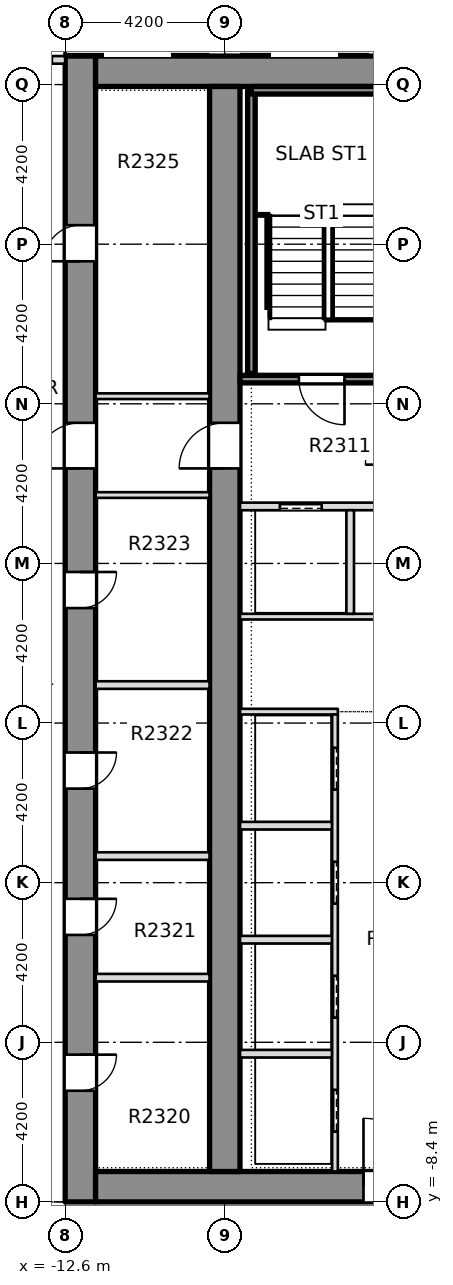
"""IFC4 building model, lengths in metres.
Left out: names, types, materials, properties, quantities, classifications, styles, units other than length and angle.
Written with IfcOpenShell. Run it as: python <this file> out.ifc"""

import sys

from ifc_helpers import new_model, si_unit, direction, frame, frame_2d, origin, place, context, subcontext, project, spatial, rectangle, extrude, element, fill, save


model = new_model("IFC4")
c1 = context("Model", 3, precision=1e-05, world=origin(), true_north=direction((0.0, 1.0)))
c2 = subcontext(c1, "Body", "Model", "MODEL_VIEW")
j1 = project(units=[si_unit("LENGTHUNIT", "METRE"), si_unit("PLANEANGLEUNIT", "RADIAN")], contexts=[c1])
p1 = place(None, origin())
s1 = spatial("IfcSite", under=j1, at=p1, CompositionType="ELEMENT")
p2 = place(p1, origin())
s2 = spatial("IfcBuilding", under=s1, at=p2, CompositionType="ELEMENT")
p3 = place(p2, frame((0.0, 0.0, 94.2)))
s3 = spatial("IfcBuildingStorey", under=s2, at=p3, CompositionType="ELEMENT", Elevation=94.2)
p4 = place(p3, frame((-12.2, -8.4, -0.32), z_axis=(0.0, 0.0, 1.0), x_axis=(0.0, 1.0, 0.0)))
e1 = element("IfcWall", 1, at=p4, inside=s3, PredefinedType="SHEAR", context=c2, shape_type="SweptSolid", body=[
    extrude(rectangle(XDim=30.15, YDim=0.8, at=frame_2d((15.075, 0.0))), origin(), (0.0, 0.0, 1.0), 3.45),
])
p5 = place(p4, frame((2.925, 0.0, 0.32)))
e2 = element("IfcOpeningElement", 2, at=p5, cuts=e1, PredefinedType="OPENING", context=c2, shape_type="SweptSolid", body=[
    extrude(rectangle(XDim=0.95, YDim=2.1, at=frame_2d((0.475, 1.05))), frame((0.0, 0.41, 0.0), z_axis=(0.0, -1.0, 0.0), x_axis=(1.0, 0.0, 0.0)), (0.0, 0.0, 1.0), 0.82),
])
p6 = place(p4, frame((7.025, 0.0, 0.32)))
e3 = element("IfcOpeningElement", 3, at=p6, cuts=e1, PredefinedType="OPENING", context=c2, shape_type="SweptSolid", body=[
    extrude(rectangle(XDim=0.95, YDim=2.1, at=frame_2d((0.475, 1.05))), frame((0.0, 0.41, 0.0), z_axis=(0.0, -1.0, 0.0), x_axis=(1.0, 0.0, 0.0)), (0.0, 0.0, 1.0), 0.82),
])
p7 = place(p4, frame((10.875, 0.0, 0.32)))
e4 = element("IfcOpeningElement", 4, at=p7, cuts=e1, PredefinedType="OPENING", context=c2, shape_type="SweptSolid", body=[
    extrude(rectangle(XDim=0.95, YDim=2.1, at=frame_2d((0.475, 1.05))), frame((0.0, 0.41, 0.0), z_axis=(0.0, -1.0, 0.0), x_axis=(1.0, 0.0, 0.0)), (0.0, 0.0, 1.0), 0.82),
])
p8 = place(p4, frame((15.625, 0.0, 0.32)))
e5 = element("IfcOpeningElement", 5, at=p8, cuts=e1, PredefinedType="OPENING", context=c2, shape_type="SweptSolid", body=[
    extrude(rectangle(XDim=0.95, YDim=2.1, at=frame_2d((0.475, 1.05))), frame((0.0, 0.41, 0.0), z_axis=(0.0, -1.0, 0.0), x_axis=(1.0, 0.0, 0.0)), (0.0, 0.0, 1.0), 0.82),
])
p9 = place(p4, frame((24.75, 0.0, 0.32)))
e6 = element("IfcOpeningElement", 6, at=p9, cuts=e1, PredefinedType="OPENING", context=c2, shape_type="SweptSolid", body=[
    extrude(rectangle(XDim=0.95, YDim=2.1, at=frame_2d((0.475, 1.05))), frame((0.0, 0.41, 0.0), z_axis=(0.0, -1.0, 0.0), x_axis=(1.0, 0.0, 0.0)), (0.0, 0.0, 1.0), 0.82),
])
p10 = place(p4, frame((19.3, 0.0, 0.32)))
e7 = element("IfcOpeningElement", 7, at=p10, cuts=e1, PredefinedType="OPENING", context=c2, shape_type="SweptSolid", body=[
    extrude(rectangle(XDim=1.2, YDim=2.1, at=frame_2d((0.6, 1.05))), frame((0.0, 0.41, 0.0), z_axis=(0.0, -1.0, 0.0), x_axis=(1.0, 0.0, 0.0)), (0.0, 0.0, 1.0), 0.82),
])
p11 = place(p3, frame((-11.8, -8.0, -0.32), z_axis=(0.0, 0.0, 1.0), x_axis=(1.0, 0.0, 0.0)))
e8 = element("IfcWall", 8, at=p11, inside=s3, PredefinedType="SHEAR", context=c2, shape_type="SweptSolid", body=[
    extrude(rectangle(XDim=23.6, YDim=0.8, at=frame_2d((11.8, 0.0))), origin(), (0.0, 0.0, 1.0), 3.45),
])
p12 = place(p11, frame((7.05, 0.0, 0.32)))
e9 = element("IfcOpeningElement", 9, at=p12, cuts=e8, PredefinedType="OPENING", context=c2, shape_type="SweptSolid", body=[
    extrude(rectangle(XDim=1.8, YDim=2.1, at=frame_2d((0.9, 1.05))), frame((0.0, 0.41, 0.0), z_axis=(0.0, -1.0, 0.0), x_axis=(1.0, 0.0, 0.0)), (0.0, 0.0, 1.0), 0.82),
])
p13 = place(p11, frame((14.75, 0.0, 0.32)))
e10 = element("IfcOpeningElement", 10, at=p13, cuts=e8, PredefinedType="OPENING", context=c2, shape_type="SweptSolid", body=[
    extrude(rectangle(XDim=1.8, YDim=2.1, at=frame_2d((0.9, 1.05))), frame((0.0, 0.41, 0.0), z_axis=(0.0, -1.0, 0.0), x_axis=(1.0, 0.0, 0.0)), (0.0, 0.0, 1.0), 0.82),
])
p14 = place(p3, frame((-11.8, 21.35, -0.32), z_axis=(0.0, 0.0, 1.0), x_axis=(1.0, 0.0, 0.0)))
e11 = element("IfcWall", 11, at=p14, inside=s3, PredefinedType="SHEAR", context=c2, shape_type="SweptSolid", body=[
    extrude(rectangle(XDim=23.6, YDim=0.8, at=frame_2d((11.8, 0.0))), origin(), (0.0, 0.0, 1.0), 3.45),
])
p15 = place(p3, frame((-8.4, -7.6, -0.32), z_axis=(0.0, 0.0, 1.0), x_axis=(0.0, 1.0, 0.0)))
e12 = element("IfcWall", 12, at=p15, inside=s3, PredefinedType="SHEAR", context=c2, shape_type="SweptSolid", body=[
    extrude(rectangle(XDim=28.55, YDim=0.8, at=frame_2d((14.275, 0.0))), origin(), (0.0, 0.0, 1.0), 3.45),
])
p16 = place(p15, frame((18.5, 0.0, 0.32)))
e13 = element("IfcOpeningElement", 13, at=p16, cuts=e12, PredefinedType="OPENING", context=c2, shape_type="SweptSolid", body=[
    extrude(rectangle(XDim=1.2, YDim=2.1, at=frame_2d((0.6, 1.05))), frame((0.0, 0.41, 0.0), z_axis=(0.0, -1.0, 0.0), x_axis=(1.0, 0.0, 0.0)), (0.0, 0.0, 1.0), 0.82),
])
p17 = place(p3, frame((-12.6, 21.65, 0.0), z_axis=(0.0, 0.0, 1.0), x_axis=(-1.0, 0.0, 0.0)))
e14 = element("IfcWall", 14, at=p17, inside=s3, PredefinedType="STANDARD", context=c2, shape_type="SweptSolid", body=[
    extrude(rectangle(XDim=3.6, YDim=0.2, at=frame_2d((1.8, 0.0))), origin(), (0.0, 0.0, 1.0), 3.13),
])
p18 = place(p17, frame((0.35, 0.0, 0.2)))
e15 = element("IfcOpeningElement", 15, at=p18, cuts=e14, PredefinedType="OPENING", context=c2, shape_type="SweptSolid", body=[
    extrude(rectangle(XDim=1.8, YDim=2.65, at=frame_2d((0.9, 1.325))), frame((0.0, 0.11, 0.0), z_axis=(0.0, -1.0, 0.0), x_axis=(1.0, 0.0, 0.0)), (0.0, 0.0, 1.0), 0.22),
])
p19 = place(p17, frame((2.3, 0.0, 0.0)))
e16 = element("IfcOpeningElement", 16, at=p19, cuts=e14, PredefinedType="OPENING", context=c2, shape_type="SweptSolid", body=[
    extrude(rectangle(XDim=1.0, YDim=2.4, at=frame_2d((0.5, 1.2))), frame((0.0, 0.11, 0.0), z_axis=(0.0, -1.0, 0.0), x_axis=(1.0, 0.0, 0.0)), (0.0, 0.0, 1.0), 0.22),
])
for number, where, z_axis, x_axis in (
    (17, (-7.999, -4.5, 0.0), (0.0, 0.0, 1.0), (1.0, 0.0, 0.0)),
    (18, (-7.999, -1.5, 0.0), (0.0, 0.0, 1.0), (1.0, 0.0, 0.0)),
    (19, (-7.999, 1.5, 0.0), (0.0, 0.0, 1.0), (1.0, 0.0, 0.0)),
):
    element("IfcWall", number, at=place(p3, frame(where, z_axis=z_axis, x_axis=x_axis)), inside=s3, PredefinedType="PARTITIONING", context=c2, shape_type="SweptSolid", body=[
        extrude(rectangle(XDim=2.424, YDim=0.2, at=frame_2d((1.212, 0.0))), origin(), (0.0, 0.0, 1.0), 3.13),
    ])
p20 = place(p3, frame((-7.999, 4.5, 0.0), z_axis=(0.0, 0.0, 1.0), x_axis=(1.0, 0.0, 0.0)))
e20 = element("IfcWall", 20, at=p20, inside=s3, PredefinedType="PARTITIONING", context=c2, shape_type="SweptSolid", body=[
    extrude(rectangle(XDim=2.574, YDim=0.15, at=frame_2d((1.287, 0.0))), origin(), (0.0, 0.0, 1.0), 3.13),
])
p21 = place(p3, frame((-7.999, 7.0, 0.0), z_axis=(0.0, 0.0, 1.0), x_axis=(1.0, 0.0, 0.0)))
e21 = element("IfcWall", 21, at=p21, inside=s3, PredefinedType="PARTITIONING", context=c2, shape_type="SweptSolid", body=[
    extrude(rectangle(XDim=15.998, YDim=0.15, at=frame_2d((7.999, 0.0))), origin(), (0.0, 0.0, 1.0), 3.13),
])
p22 = place(p21, frame((7.299, 0.0, 0.0)))
e22 = element("IfcOpeningElement", 22, at=p22, cuts=e21, PredefinedType="OPENING", context=c2, shape_type="SweptSolid", body=[
    extrude(rectangle(XDim=1.4, YDim=2.1, at=frame_2d((0.7, 1.05))), frame((0.0, 0.085, 0.0), z_axis=(0.0, -1.0, 0.0), x_axis=(1.0, 0.0, 0.0)), (0.0, 0.0, 1.0), 0.17),
])
p23 = place(p3, frame((-7.999, 9.9, 0.0), z_axis=(0.0, 0.0, 1.0), x_axis=(1.0, 0.0, 0.0)))
e23 = element("IfcWall", 23, at=p23, inside=s3, PredefinedType="PARTITIONING", context=c2, shape_type="SweptSolid", body=[
    extrude(rectangle(XDim=4.399, YDim=0.2, at=frame_2d((2.199, 0.0))), origin(), (0.0, 0.0, 1.0), 3.13),
])
p24 = place(p23, frame((1.049, 0.0, 0.0)))
e24 = element("IfcOpeningElement", 24, at=p24, cuts=e23, PredefinedType="OPENING", context=c2, shape_type="SweptSolid", body=[
    extrude(rectangle(XDim=1.1, YDim=2.1, at=frame_2d((0.55, 1.05))), frame((0.0, 0.11, 0.0), z_axis=(0.0, -1.0, 0.0), x_axis=(1.0, 0.0, 0.0)), (0.0, 0.0, 1.0), 0.22),
])
p25 = place(p3, frame((-7.999, 13.25, 0.0), z_axis=(0.0, 0.0, 1.0), x_axis=(1.0, 0.0, 0.0)))
e25 = element("IfcWall", 25, at=p25, inside=s3, PredefinedType="SOLIDWALL", context=c2, shape_type="SweptSolid", body=[
    extrude(rectangle(XDim=4.574, YDim=0.2, at=frame_2d((2.287, 0.0))), origin(), (0.0, 0.0, 1.0), 3.13),
])
p26 = place(p25, frame((1.549, 0.0, 0.0)))
e26 = element("IfcOpeningElement", 26, at=p26, cuts=e25, PredefinedType="OPENING", context=c2, shape_type="SweptSolid", body=[
    extrude(rectangle(XDim=1.2, YDim=2.1, at=frame_2d((0.6, 1.05))), frame((0.0, 0.11, 0.0), z_axis=(0.0, -1.0, 0.0), x_axis=(1.0, 0.0, 0.0)), (0.0, 0.0, 1.0), 0.22),
])
p27 = place(p3, frame((-5.5, -7.599, 0.0), z_axis=(0.0, 0.0, 1.0), x_axis=(0.0, 1.0, 0.0)))
e27 = element("IfcWall", 27, at=p27, inside=s3, PredefinedType="PARTITIONING", context=c2, shape_type="SweptSolid", body=[
    extrude(rectangle(XDim=12.024, YDim=0.15, at=frame_2d((6.012, 0.0))), origin(), (0.0, 0.0, 1.0), 3.13),
])
p28 = place(p27, frame((1.049, 0.0, 0.0)))
e28 = element("IfcOpeningElement", 28, at=p28, cuts=e27, PredefinedType="OPENING", context=c2, shape_type="SweptSolid", body=[
    extrude(rectangle(XDim=1.1, YDim=2.1, at=frame_2d((0.55, 1.05))), frame((0.0, 0.085, 0.0), z_axis=(0.0, -1.0, 0.0), x_axis=(1.0, 0.0, 0.0)), (0.0, 0.0, 1.0), 0.17),
])
p29 = place(p27, frame((4.049, 0.0, 0.0)))
e29 = element("IfcOpeningElement", 29, at=p29, cuts=e27, PredefinedType="OPENING", context=c2, shape_type="SweptSolid", body=[
    extrude(rectangle(XDim=1.1, YDim=2.1, at=frame_2d((0.55, 1.05))), frame((0.0, 0.085, 0.0), z_axis=(0.0, -1.0, 0.0), x_axis=(1.0, 0.0, 0.0)), (0.0, 0.0, 1.0), 0.17),
])
p30 = place(p27, frame((7.049, 0.0, 0.0)))
e30 = element("IfcOpeningElement", 30, at=p30, cuts=e27, PredefinedType="OPENING", context=c2, shape_type="SweptSolid", body=[
    extrude(rectangle(XDim=1.1, YDim=2.1, at=frame_2d((0.55, 1.05))), frame((0.0, 0.085, 0.0), z_axis=(0.0, -1.0, 0.0), x_axis=(1.0, 0.0, 0.0)), (0.0, 0.0, 1.0), 0.17),
])
p31 = place(p27, frame((10.049, 0.0, 0.0)))
e31 = element("IfcOpeningElement", 31, at=p31, cuts=e27, PredefinedType="OPENING", context=c2, shape_type="SweptSolid", body=[
    extrude(rectangle(XDim=1.1, YDim=2.1, at=frame_2d((0.55, 1.05))), frame((0.0, 0.085, 0.0), z_axis=(0.0, -1.0, 0.0), x_axis=(1.0, 0.0, 0.0)), (0.0, 0.0, 1.0), 0.17),
])
p32 = place(p3, frame((-5.1, 7.075, 0.0), z_axis=(0.0, 0.0, 1.0), x_axis=(0.0, 1.0, 0.0)))
e32 = element("IfcWall", 32, at=p32, inside=s3, PredefinedType="PARTITIONING", context=c2, shape_type="SweptSolid", body=[
    extrude(rectangle(XDim=2.725, YDim=0.2, at=frame_2d((1.363, 0.0))), origin(), (0.0, 0.0, 1.0), 3.13),
])
for number, where, z_axis, x_axis in (
    (33, (-11.799, -2.5, 0.0), (0.0, 0.0, 1.0), (1.0, 0.0, 0.0)),
    (34, (-11.799, 0.7, 0.0), (0.0, 0.0, 1.0), (1.0, 0.0, 0.0)),
    (35, (-11.799, 5.2, 0.0), (0.0, 0.0, 1.0), (1.0, 0.0, 0.0)),
):
    element("IfcWall", number, at=place(p3, frame(where, z_axis=z_axis, x_axis=x_axis)), inside=s3, PredefinedType="PARTITIONING", context=c2, shape_type="SweptSolid", body=[
        extrude(rectangle(XDim=2.998, YDim=0.2, at=frame_2d((1.499, 0.0))), origin(), (0.0, 0.0, 1.0), 3.13),
    ])
for number, where, z_axis, x_axis in (
    (36, (-11.799, 10.2, 0.0), (0.0, 0.0, 1.0), (1.0, 0.0, 0.0)),
    (37, (-11.799, 12.8, 0.0), (0.0, 0.0, 1.0), (1.0, 0.0, 0.0)),
):
    element("IfcWall", number, at=place(p3, frame(where, z_axis=z_axis, x_axis=x_axis)), inside=s3, PredefinedType="PARTITIONING", context=c2, shape_type="SweptSolid", body=[
        extrude(rectangle(XDim=2.998, YDim=0.15, at=frame_2d((1.499, 0.0))), origin(), (0.0, 0.0, 1.0), 3.13),
    ])
p33 = place(p3, frame((-7.7, 13.4, 0.0), z_axis=(0.0, 0.0, 1.0), x_axis=(0.0, 1.0, 0.0)))
e38 = element("IfcWall", 38, at=p33, inside=s3, PredefinedType="SOLIDWALL", context=c2, shape_type="SweptSolid", body=[
    extrude(rectangle(XDim=7.45, YDim=0.2, at=frame_2d((3.725, 0.0))), origin(), (0.0, 0.0, 1.0), 3.13),
])
p34 = place(p3, frame((-7.7, 20.85, 0.0), z_axis=(0.0, 0.0, 1.0), x_axis=(1.0, 0.0, 0.0)))
e39 = element("IfcWall", 39, at=p34, inside=s3, PredefinedType="SOLIDWALL", context=c2, shape_type="SweptSolid", body=[
    extrude(rectangle(XDim=3.55, YDim=0.2, at=frame_2d((1.775, 0.0))), origin(), (0.0, 0.0, 1.0), 3.13),
])
p35 = place(p28, origin())
e40 = element("IfcDoor", 40, at=p35, inside=s3, OperationType="SLIDING_TO_LEFT", PredefinedType="DOOR", context=c2, shape_type="SweptSolid", body=[
    extrude(rectangle(XDim=1.1, YDim=2.1, at=frame_2d((0.55, 1.05))), frame((0.0, 0.025, 0.0), z_axis=(0.0, -1.0, 0.0), x_axis=(1.0, 0.0, 0.0)), (0.0, 0.0, 1.0), 0.05),
])
fill(e28, e40)
p36 = place(p29, origin())
e41 = element("IfcDoor", 41, at=p36, inside=s3, OperationType="SLIDING_TO_LEFT", PredefinedType="DOOR", context=c2, shape_type="SweptSolid", body=[
    extrude(rectangle(XDim=1.1, YDim=2.1, at=frame_2d((0.55, 1.05))), frame((0.0, 0.025, 0.0), z_axis=(0.0, -1.0, 0.0), x_axis=(1.0, 0.0, 0.0)), (0.0, 0.0, 1.0), 0.05),
])
fill(e29, e41)
p37 = place(p30, origin())
e42 = element("IfcDoor", 42, at=p37, inside=s3, OperationType="SLIDING_TO_LEFT", PredefinedType="DOOR", context=c2, shape_type="SweptSolid", body=[
    extrude(rectangle(XDim=1.1, YDim=2.1, at=frame_2d((0.55, 1.05))), frame((0.0, 0.025, 0.0), z_axis=(0.0, -1.0, 0.0), x_axis=(1.0, 0.0, 0.0)), (0.0, 0.0, 1.0), 0.05),
])
fill(e30, e42)
p38 = place(p31, origin())
e43 = element("IfcDoor", 43, at=p38, inside=s3, OperationType="SLIDING_TO_LEFT", PredefinedType="DOOR", context=c2, shape_type="SweptSolid", body=[
    extrude(rectangle(XDim=1.1, YDim=2.1, at=frame_2d((0.55, 1.05))), frame((0.0, 0.025, 0.0), z_axis=(0.0, -1.0, 0.0), x_axis=(1.0, 0.0, 0.0)), (0.0, 0.0, 1.0), 0.05),
])
fill(e31, e43)
p39 = place(p26, origin())
e44 = element("IfcDoor", 44, at=p39, inside=s3, OperationType="SINGLE_SWING_LEFT", PredefinedType="DOOR", context=c2, shape_type="SweptSolid", body=[
    extrude(rectangle(XDim=1.2, YDim=2.1, at=frame_2d((0.6, 1.05))), frame((0.0, 0.025, 0.0), z_axis=(0.0, -1.0, 0.0), x_axis=(1.0, 0.0, 0.0)), (0.0, 0.0, 1.0), 0.05),
])
fill(e26, e44)
p40 = place(p24, origin())
e45 = element("IfcDoor", 45, at=p40, inside=s3, OperationType="SLIDING_TO_LEFT", PredefinedType="DOOR", context=c2, shape_type="SweptSolid", body=[
    extrude(rectangle(XDim=1.1, YDim=2.1, at=frame_2d((0.55, 1.05))), frame((0.0, 0.025, 0.0), z_axis=(0.0, -1.0, 0.0), x_axis=(1.0, 0.0, 0.0)), (0.0, 0.0, 1.0), 0.05),
])
fill(e24, e45)
p41 = place(p12, origin())
e46 = element("IfcDoor", 46, at=p41, inside=s3, OperationType="SINGLE_SWING_LEFT", PredefinedType="DOOR", context=c2, shape_type="SweptSolid", body=[
    extrude(rectangle(XDim=1.8, YDim=2.1, at=frame_2d((0.9, 1.05))), frame((0.0, 0.025, 0.0), z_axis=(0.0, -1.0, 0.0), x_axis=(1.0, 0.0, 0.0)), (0.0, 0.0, 1.0), 0.05),
])
fill(e9, e46)
p42 = place(p5, origin())
e47 = element("IfcDoor", 47, at=p42, inside=s3, OperationType="SINGLE_SWING_LEFT", PredefinedType="DOOR", context=c2, shape_type="SweptSolid", body=[
    extrude(rectangle(XDim=0.95, YDim=2.1, at=frame_2d((0.475, 1.05))), frame((0.0, 0.025, 0.0), z_axis=(0.0, -1.0, 0.0), x_axis=(1.0, 0.0, 0.0)), (0.0, 0.0, 1.0), 0.05),
])
fill(e2, e47)
p43 = place(p6, origin())
e48 = element("IfcDoor", 48, at=p43, inside=s3, OperationType="SINGLE_SWING_LEFT", PredefinedType="DOOR", context=c2, shape_type="SweptSolid", body=[
    extrude(rectangle(XDim=0.95, YDim=2.1, at=frame_2d((0.475, 1.05))), frame((0.0, 0.025, 0.0), z_axis=(0.0, -1.0, 0.0), x_axis=(1.0, 0.0, 0.0)), (0.0, 0.0, 1.0), 0.05),
])
fill(e3, e48)
p44 = place(p7, origin())
e49 = element("IfcDoor", 49, at=p44, inside=s3, OperationType="SINGLE_SWING_LEFT", PredefinedType="DOOR", context=c2, shape_type="SweptSolid", body=[
    extrude(rectangle(XDim=0.95, YDim=2.1, at=frame_2d((0.475, 1.05))), frame((0.0, 0.025, 0.0), z_axis=(0.0, -1.0, 0.0), x_axis=(1.0, 0.0, 0.0)), (0.0, 0.0, 1.0), 0.05),
])
fill(e4, e49)
p45 = place(p8, origin())
e50 = element("IfcDoor", 50, at=p45, inside=s3, OperationType="SINGLE_SWING_LEFT", PredefinedType="DOOR", context=c2, shape_type="SweptSolid", body=[
    extrude(rectangle(XDim=0.95, YDim=2.1, at=frame_2d((0.475, 1.05))), frame((0.0, 0.025, 0.0), z_axis=(0.0, -1.0, 0.0), x_axis=(1.0, 0.0, 0.0)), (0.0, 0.0, 1.0), 0.05),
])
fill(e5, e50)
p46 = place(p9, origin())
e51 = element("IfcDoor", 51, at=p46, inside=s3, OperationType="SINGLE_SWING_LEFT", PredefinedType="DOOR", context=c2, shape_type="SweptSolid", body=[
    extrude(rectangle(XDim=0.95, YDim=2.1, at=frame_2d((0.475, 1.05))), frame((0.0, 0.025, 0.0), z_axis=(0.0, -1.0, 0.0), x_axis=(1.0, 0.0, 0.0)), (0.0, 0.0, 1.0), 0.05),
])
fill(e6, e51)
p47 = place(p10, origin())
e52 = element("IfcDoor", 52, at=p47, inside=s3, OperationType="SINGLE_SWING_LEFT", PredefinedType="DOOR", context=c2, shape_type="SweptSolid", body=[
    extrude(rectangle(XDim=1.2, YDim=2.1, at=frame_2d((0.6, 1.05))), frame((0.0, 0.025, 0.0), z_axis=(0.0, -1.0, 0.0), x_axis=(1.0, 0.0, 0.0)), (0.0, 0.0, 1.0), 0.05),
])
fill(e7, e52)
p48 = place(p16, origin())
e53 = element("IfcDoor", 53, at=p48, inside=s3, OperationType="SINGLE_SWING_LEFT", PredefinedType="DOOR", context=c2, shape_type="SweptSolid", body=[
    extrude(rectangle(XDim=1.2, YDim=2.1, at=frame_2d((0.6, 1.05))), frame((0.0, 0.025, 0.0), z_axis=(0.0, -1.0, 0.0), x_axis=(1.0, 0.0, 0.0)), (0.0, 0.0, 1.0), 0.05),
])
fill(e13, e53)
save(model, sys.argv[1])
